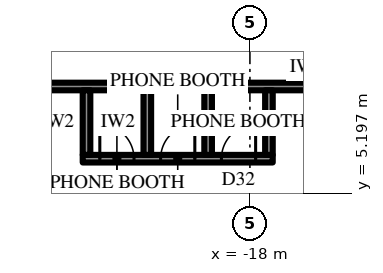
"""IFC4 building model, lengths in metres.
Left out: names, types, materials, properties, quantities, classifications, styles, units other than length and angle.
Written with IfcOpenShell. Run it as: python <this file> out.ifc"""

import sys

from ifc_helpers import new_model, si_unit, direction, frame, frame_2d, origin, place, context, subcontext, project, spatial, rectangle, extrude, element, fill, save


model = new_model("IFC4")
c1 = context("Model", 3, precision=1e-05, world=origin(), true_north=direction((0.0, 1.0)))
c2 = subcontext(c1, "Body", "Model", "MODEL_VIEW")
j1 = project(units=[si_unit("LENGTHUNIT", "METRE"), si_unit("PLANEANGLEUNIT", "RADIAN")], contexts=[c1])
p1 = place(None, origin())
s1 = spatial("IfcSite", under=j1, at=p1, CompositionType="ELEMENT")
p2 = place(p1, origin())
s2 = spatial("IfcBuilding", under=s1, at=p2, CompositionType="ELEMENT")
p3 = place(p2, frame((0.0, 0.0, 340.9)))
s3 = spatial("IfcBuildingStorey", under=s2, at=p3, CompositionType="ELEMENT", Elevation=340.9)
p4 = place(p3, frame((-12.425, 8.0, 0.0), z_axis=(0.0, 0.0, 1.0), x_axis=(-1.0, 0.0, 0.0)))
e1 = element("IfcWall", 1, at=p4, inside=s3, PredefinedType="PARTITIONING", context=c2, shape_type="SweptSolid", body=[
    extrude(rectangle(XDim=13.59, YDim=0.2, at=frame_2d((6.795, 0.0))), origin(), (0.0, 0.0, 1.0), 4.0),
])
p5 = place(p4, frame((0.859, 0.0, 0.0)))
e2 = element("IfcOpeningElement", 2, at=p5, cuts=e1, PredefinedType="OPENING", context=c2, shape_type="SweptSolid", body=[
    extrude(rectangle(XDim=1.0, YDim=2.2, at=frame_2d((0.5, 1.1))), frame((0.0, 0.11, 0.0), z_axis=(0.0, -1.0, 0.0), x_axis=(1.0, 0.0, 0.0)), (0.0, 0.0, 1.0), 0.22),
])
p6 = place(p3, frame((-17.4, 6.1, 0.0), z_axis=(0.0, 0.0, 1.0), x_axis=(-1.0, 0.0, 0.0)))
e3 = element("IfcWall", 3, at=p6, inside=s3, PredefinedType="PARTITIONING", context=c2, shape_type="SweptSolid", body=[
    extrude(rectangle(XDim=5.0, YDim=0.2, at=frame_2d((2.5, 0.0))), origin(), (0.0, 0.0, 1.0), 4.0),
])
p7 = place(p6, frame((0.45, 0.0, 0.0)))
e4 = element("IfcOpeningElement", 4, at=p7, cuts=e3, PredefinedType="OPENING", context=c2, shape_type="SweptSolid", body=[
    extrude(rectangle(XDim=0.9, YDim=2.2, at=frame_2d((0.45, 1.1))), frame((0.0, 0.11, 0.0), z_axis=(0.0, -1.0, 0.0), x_axis=(1.0, 0.0, 0.0)), (0.0, 0.0, 1.0), 0.22),
])
p8 = place(p6, frame((2.05, 0.0, 0.0)))
e5 = element("IfcOpeningElement", 5, at=p8, cuts=e3, PredefinedType="OPENING", context=c2, shape_type="SweptSolid", body=[
    extrude(rectangle(XDim=0.9, YDim=2.2, at=frame_2d((0.45, 1.1))), frame((0.0, 0.11, 0.0), z_axis=(0.0, -1.0, 0.0), x_axis=(1.0, 0.0, 0.0)), (0.0, 0.0, 1.0), 0.22),
])
p9 = place(p6, frame((3.65, 0.0, 0.0)))
e6 = element("IfcOpeningElement", 6, at=p9, cuts=e3, PredefinedType="OPENING", context=c2, shape_type="SweptSolid", body=[
    extrude(rectangle(XDim=0.9, YDim=2.2, at=frame_2d((0.45, 1.1))), frame((0.0, 0.11, 0.0), z_axis=(0.0, -1.0, 0.0), x_axis=(1.0, 0.0, 0.0)), (0.0, 0.0, 1.0), 0.22),
])
for number, where, z_axis, x_axis in (
    (7, (-17.5, 7.9, 0.0), (0.0, 0.0, 1.0), (0.0, -1.0, 0.0)),
    (8, (-19.1, 7.9, 0.0), (0.0, 0.0, 1.0), (0.0, -1.0, 0.0)),
    (9, (-20.7, 7.9, 0.0), (0.0, 0.0, 1.0), (0.0, -1.0, 0.0)),
    (10, (-22.3, 7.9, 0.0), (0.0, 0.0, 1.0), (0.0, -1.0, 0.0)),
):
    element("IfcWall", number, at=place(p3, frame(where, z_axis=z_axis, x_axis=x_axis)), inside=s3, PredefinedType="PARTITIONING", context=c2, shape_type="SweptSolid", body=[
        extrude(rectangle(XDim=1.7, YDim=0.2, at=frame_2d((0.85, 0.0))), origin(), (0.0, 0.0, 1.0), 4.0),
    ])
p10 = place(p7, frame((0.9, 0.0, 0.0), z_axis=(0.0, 0.0, 1.0), x_axis=(-1.0, 0.0, 0.0)))
e11 = element("IfcDoor", 11, at=p10, inside=s3, OperationType="SINGLE_SWING_LEFT", PredefinedType="DOOR", context=c2, shape_type="SweptSolid", body=[
    extrude(rectangle(XDim=0.9, YDim=2.2, at=frame_2d((0.45, 1.1))), frame((0.0, 0.025, 0.0), z_axis=(0.0, -1.0, 0.0), x_axis=(1.0, 0.0, 0.0)), (0.0, 0.0, 1.0), 0.05),
])
fill(e4, e11)
p11 = place(p8, frame((0.9, 0.0, 0.0), z_axis=(0.0, 0.0, 1.0), x_axis=(-1.0, 0.0, 0.0)))
e12 = element("IfcDoor", 12, at=p11, inside=s3, OperationType="SINGLE_SWING_LEFT", PredefinedType="DOOR", context=c2, shape_type="SweptSolid", body=[
    extrude(rectangle(XDim=0.9, YDim=2.2, at=frame_2d((0.45, 1.1))), frame((0.0, 0.025, 0.0), z_axis=(0.0, -1.0, 0.0), x_axis=(1.0, 0.0, 0.0)), (0.0, 0.0, 1.0), 0.05),
])
fill(e5, e12)
p12 = place(p9, frame((0.9, 0.0, 0.0), z_axis=(0.0, 0.0, 1.0), x_axis=(-1.0, 0.0, 0.0)))
e13 = element("IfcDoor", 13, at=p12, inside=s3, OperationType="SINGLE_SWING_RIGHT", PredefinedType="DOOR", context=c2, shape_type="SweptSolid", body=[
    extrude(rectangle(XDim=0.9, YDim=2.2, at=frame_2d((0.45, 1.1))), frame((0.0, 0.025, 0.0), z_axis=(0.0, -1.0, 0.0), x_axis=(1.0, 0.0, 0.0)), (0.0, 0.0, 1.0), 0.05),
])
fill(e6, e13)
save(model, sys.argv[1])
